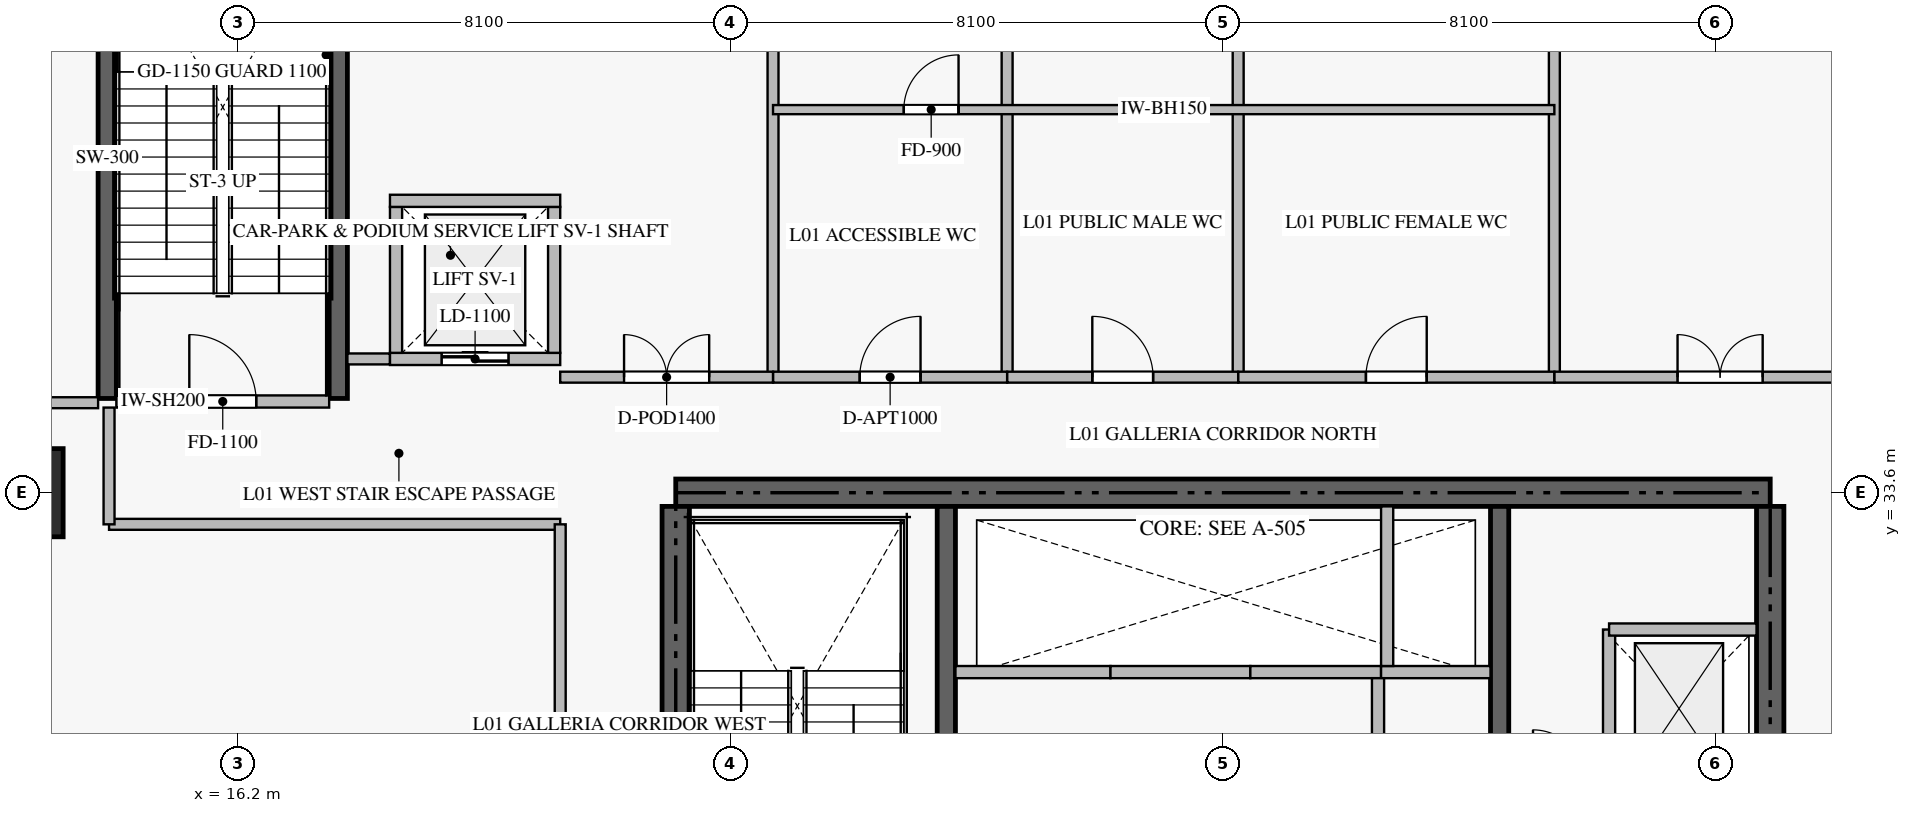
"""IFC4 building model, lengths in metres.
Left out: names, types, materials, properties, quantities, classifications, styles, units other than length and angle.
Written with IfcOpenShell. Run it as: python <this file> out.ifc"""

import sys

from ifc_helpers import new_model, si_unit, direction, frame, frame_2d, origin, origin_2d, place, context, subcontext, project, spatial, rectangle, extrude, source, transform, mapped, element, fill, save


model = new_model("IFC4")
c1 = context("Model", 3, precision=1e-05, world=origin(), true_north=direction((0.0, 1.0)))
c2 = subcontext(c1, "Body", "Model", "MODEL_VIEW")
j1 = project(units=[si_unit("LENGTHUNIT", "METRE"), si_unit("PLANEANGLEUNIT", "RADIAN")], contexts=[c1])
p1 = place(None, origin())
s1 = spatial("IfcSite", under=j1, at=p1, CompositionType="ELEMENT")
p2 = place(p1, origin())
s2 = spatial("IfcBuilding", under=s1, at=p2, CompositionType="ELEMENT")
p3 = place(p2, frame((0.0, 0.0, 5.5)))
s3 = spatial("IfcBuildingStorey", under=s2, at=p3, CompositionType="ELEMENT", Elevation=5.5)
p4 = place(p3, frame((41.4, 33.6, -0.38), z_axis=(0.0, 0.0, 1.0), x_axis=(-1.0, 0.0, 0.0)))
e1 = element("IfcWall", 1, at=p4, inside=s3, PredefinedType="SHEAR", context=c2, shape_type="SweptSolid", body=[
    extrude(rectangle(XDim=18.0, YDim=0.45, at=frame_2d((9.0, 0.0))), origin(), (0.0, 0.0, 1.0), 4.998),
])
p5 = place(p3, frame((23.4, 24.25, -0.38), z_axis=(0.0, 0.0, 1.0), x_axis=(0.0, 1.0, 0.0)))
e2 = element("IfcWall", 2, at=p5, inside=s3, PredefinedType="SHEAR", context=c2, shape_type="SweptSolid", body=[
    extrude(rectangle(XDim=9.125, YDim=0.45, at=frame_2d((4.562, 0.0))), origin(), (0.0, 0.0, 1.0), 4.998),
])
p6 = place(p3, frame((41.4, 27.75, -0.38), z_axis=(0.0, 0.0, 1.0), x_axis=(0.0, 1.0, 0.0)))
e3 = element("IfcWall", 3, at=p6, inside=s3, PredefinedType="SHEAR", context=c2, shape_type="SweptSolid", body=[
    extrude(rectangle(XDim=5.625, YDim=0.45, at=frame_2d((2.812, 0.0))), origin(), (0.0, 0.0, 1.0), 4.998),
])
p7 = place(p3, frame((27.85, 23.55, -0.38), z_axis=(0.0, 0.0, 1.0), x_axis=(0.0, 1.0, 0.0)))
e4 = element("IfcWall", 4, at=p7, inside=s3, PredefinedType="SHEAR", context=c2, shape_type="SweptSolid", body=[
    extrude(rectangle(XDim=9.825, YDim=0.3, at=frame_2d((4.913, 0.0))), origin(), (0.0, 0.0, 1.0), 4.998),
])
p8 = place(p3, frame((36.95, 27.05, -0.38), z_axis=(0.0, 0.0, 1.0), x_axis=(0.0, 1.0, 0.0)))
e5 = element("IfcWall", 5, at=p8, inside=s3, PredefinedType="SHEAR", context=c2, shape_type="SweptSolid", body=[
    extrude(rectangle(XDim=6.325, YDim=0.3, at=frame_2d((3.163, 0.0))), origin(), (0.0, 0.0, 1.0), 4.998),
])
m1 = source(origin(), c2, "Body", "SweptSolid", [
    extrude(rectangle(XDim=1.45, YDim=1.45, at=origin_2d()), origin(), (0.0, 0.0, 1.0), 5.0),
])
p9 = place(p3, frame((12.6, 33.6, -0.38), z_axis=(0.0, 0.0, 1.0), x_axis=(1.0, 0.0, 0.0)))
e6 = element("IfcColumn", 6, at=p9, inside=s3, PredefinedType="COLUMN", context=c2, shape_type="MappedRepresentation", body=[
    mapped(m1, transform((0.0, 0.0, 0.0), scale=1.0)),
])
for number, where, z_axis, x_axis in (
    (7, (14.05, 35.15, -0.38), (0.0, 0.0, 1.0), (0.0, 1.0, 0.0)),
    (8, (17.85, 35.15, -0.38), (0.0, 0.0, 1.0), (0.0, 1.0, 0.0)),
):
    element("IfcWall", number, at=place(p3, frame(where, z_axis=z_axis, x_axis=x_axis)), inside=s3, PredefinedType="SHEAR", context=c2, shape_type="SweptSolid", body=[
        extrude(rectangle(XDim=7.9, YDim=0.3, at=frame_2d((3.95, 0.0))), origin(), (0.0, 0.0, 1.0), 4.998),
    ])
p10 = place(p3, frame((14.2, 35.1, 0.0), z_axis=(0.0, 0.0, 1.0), x_axis=(1.0, 0.0, 0.0)))
e9 = element("IfcWall", 9, at=p10, inside=s3, PredefinedType="STANDARD", context=c2, shape_type="SweptSolid", body=[
    extrude(rectangle(XDim=3.5, YDim=0.2, at=frame_2d((1.75, 0.0))), origin(), (0.0, 0.0, 1.0), 4.62),
])
p11 = place(p10, frame((1.2, 0.0, 0.0)))
e10 = element("IfcOpeningElement", 10, at=p11, cuts=e9, PredefinedType="OPENING", context=c2, shape_type="SweptSolid", body=[
    extrude(rectangle(XDim=1.1, YDim=2.15, at=frame_2d((0.55, 1.075))), frame((0.0, 0.11, 0.0), z_axis=(0.0, -1.0, 0.0), x_axis=(1.0, 0.0, 0.0)), (0.0, 0.0, 1.0), 0.22),
])
p12 = place(p3, frame((28.0, 30.65, 0.0), z_axis=(0.0, 0.0, 1.0), x_axis=(1.0, 0.0, 0.0)))
e11 = element("IfcWall", 11, at=p12, inside=s3, PredefinedType="STANDARD", context=c2, shape_type="SweptSolid", body=[
    extrude(rectangle(XDim=2.55, YDim=0.2, at=frame_2d((1.275, 0.0))), origin(), (0.0, 0.0, 1.0), 4.62),
])
p13 = place(p3, frame((30.55, 30.65, 0.0), z_axis=(0.0, 0.0, 1.0), x_axis=(1.0, 0.0, 0.0)))
e12 = element("IfcWall", 12, at=p13, inside=s3, PredefinedType="STANDARD", context=c2, shape_type="SweptSolid", body=[
    extrude(rectangle(XDim=2.3, YDim=0.2, at=frame_2d((1.15, 0.0))), origin(), (0.0, 0.0, 1.0), 4.62),
])
p14 = place(p3, frame((32.85, 30.65, 0.0), z_axis=(0.0, 0.0, 1.0), x_axis=(1.0, 0.0, 0.0)))
e13 = element("IfcWall", 13, at=p14, inside=s3, PredefinedType="STANDARD", context=c2, shape_type="SweptSolid", body=[
    extrude(rectangle(XDim=2.15, YDim=0.2, at=frame_2d((1.075, 0.0))), origin(), (0.0, 0.0, 1.0), 4.62),
])
p15 = place(p3, frame((35.0, 30.65, 0.0), z_axis=(0.0, 0.0, 1.0), x_axis=(1.0, 0.0, 0.0)))
e14 = element("IfcWall", 14, at=p15, inside=s3, PredefinedType="STANDARD", context=c2, shape_type="SweptSolid", body=[
    extrude(rectangle(XDim=1.8, YDim=0.2, at=frame_2d((0.9, 0.0))), origin(), (0.0, 0.0, 1.0), 4.62),
])
p16 = place(p3, frame((35.1, 30.75, 0.0), z_axis=(0.0, 0.0, 1.0), x_axis=(0.0, 1.0, 0.0)))
e15 = element("IfcWall", 15, at=p16, inside=s3, PredefinedType="STANDARD", context=c2, shape_type="SweptSolid", body=[
    extrude(rectangle(XDim=2.625, YDim=0.2, at=frame_2d((1.312, 0.0))), origin(), (0.0, 0.0, 1.0), 4.62),
])
p17 = place(p3, frame((18.7, 35.8, 0.0), z_axis=(0.0, 0.0, 1.0), x_axis=(1.0, 0.0, 0.0)))
e16 = element("IfcWall", 16, at=p17, inside=s3, PredefinedType="STANDARD", context=c2, shape_type="SweptSolid", body=[
    extrude(rectangle(XDim=2.8, YDim=0.2, at=frame_2d((1.4, 0.0))), origin(), (0.0, 0.0, 1.0), 4.62),
])
p18 = place(p17, frame((0.85, 0.0, 0.0)))
e17 = element("IfcOpeningElement", 17, at=p18, cuts=e16, PredefinedType="OPENING", context=c2, shape_type="SweptSolid", body=[
    extrude(rectangle(XDim=1.1, YDim=2.2, at=frame_2d((0.55, 1.1))), frame((0.0, 0.11, 0.0), z_axis=(0.0, -1.0, 0.0), x_axis=(1.0, 0.0, 0.0)), (0.0, 0.0, 1.0), 0.22),
])
for number, where, z_axis, x_axis in (
    (18, (18.8, 35.9, 0.0), (0.0, 0.0, 1.0), (0.0, 1.0, 0.0)),
    (19, (21.4, 35.9, 0.0), (0.0, 0.0, 1.0), (0.0, 1.0, 0.0)),
):
    element("IfcWall", number, at=place(p3, frame(where, z_axis=z_axis, x_axis=x_axis)), inside=s3, PredefinedType="STANDARD", context=c2, shape_type="SweptSolid", body=[
        extrude(rectangle(XDim=2.4, YDim=0.2, at=frame_2d((1.2, 0.0))), origin(), (0.0, 0.0, 1.0), 4.62),
    ])
p19 = place(p3, frame((18.7, 38.4, 0.0), z_axis=(0.0, 0.0, 1.0), x_axis=(1.0, 0.0, 0.0)))
e20 = element("IfcWall", 20, at=p19, inside=s3, PredefinedType="STANDARD", context=c2, shape_type="SweptSolid", body=[
    extrude(rectangle(XDim=2.8, YDim=0.2, at=frame_2d((1.4, 0.0))), origin(), (0.0, 0.0, 1.0), 4.62),
])
p20 = place(p3, frame((38.75, 28.85, 0.0), z_axis=(0.0, 0.0, 1.0), x_axis=(0.0, 1.0, 0.0)))
e21 = element("IfcWall", 21, at=p20, inside=s3, PredefinedType="STANDARD", context=c2, shape_type="SweptSolid", body=[
    extrude(rectangle(XDim=2.5, YDim=0.2, at=frame_2d((1.25, 0.0))), origin(), (0.0, 0.0, 1.0), 4.62),
])
p21 = place(p3, frame((38.75, 31.35, 0.0), z_axis=(0.0, 0.0, 1.0), x_axis=(1.0, 0.0, 0.0)))
e22 = element("IfcWall", 22, at=p21, inside=s3, PredefinedType="STANDARD", context=c2, shape_type="SweptSolid", body=[
    extrude(rectangle(XDim=2.425, YDim=0.2, at=frame_2d((1.212, 0.0))), origin(), (0.0, 0.0, 1.0), 4.62),
])
p22 = place(p3, frame((34.95, 26.95, 0.0), z_axis=(0.0, 0.0, 1.0), x_axis=(0.0, 1.0, 0.0)))
e23 = element("IfcWall", 23, at=p22, inside=s3, PredefinedType="STANDARD", context=c2, shape_type="SweptSolid", body=[
    extrude(rectangle(XDim=3.6, YDim=0.2, at=frame_2d((1.8, 0.0))), origin(), (0.0, 0.0, 1.0), 4.62),
])
p23 = place(p22, frame((1.35, 0.0, 0.0)))
e24 = element("IfcOpeningElement", 24, at=p23, cuts=e23, PredefinedType="OPENING", context=c2, shape_type="SweptSolid", body=[
    extrude(rectangle(XDim=0.9, YDim=2.1, at=frame_2d((0.45, 1.05))), frame((0.0, 0.11, 0.0), z_axis=(0.0, -1.0, 0.0), x_axis=(1.0, 0.0, 0.0)), (0.0, 0.0, 1.0), 0.22),
])
p24 = place(p3, frame((0.082, 35.08, 0.0), z_axis=(0.0, 0.0, 1.0), x_axis=(1.0, 0.0, 0.0)))
e25 = element("IfcWall", 25, at=p24, inside=s3, PredefinedType="PARTITIONING", context=c2, shape_type="SweptSolid", body=[
    extrude(rectangle(XDim=13.818, YDim=0.18, at=frame_2d((6.909, 0.0))), origin(), (0.0, 0.0, 1.0), 4.62),
])
p25 = place(p3, frame((14.08, 33.08, 0.0), z_axis=(0.0, 0.0, 1.0), x_axis=(1.0, 0.0, 0.0)))
e26 = element("IfcWall", 26, at=p25, inside=s3, PredefinedType="PARTITIONING", context=c2, shape_type="SweptSolid", body=[
    extrude(rectangle(XDim=7.42, YDim=0.18, at=frame_2d((3.71, 0.0))), origin(), (0.0, 0.0, 1.0), 4.62),
])
p26 = place(p3, frame((18.0, 35.8, 0.0), z_axis=(0.0, 0.0, 1.0), x_axis=(1.0, 0.0, 0.0)))
e27 = element("IfcWall", 27, at=p26, inside=s3, PredefinedType="PARTITIONING", context=c2, shape_type="SweptSolid", body=[
    extrude(rectangle(XDim=0.698, YDim=0.18, at=frame_2d((0.349, 0.0))), origin(), (0.0, 0.0, 1.0), 4.62),
])
p27 = place(p3, frame((14.08, 33.08, 0.0), z_axis=(0.0, 0.0, 1.0), x_axis=(0.0, 1.0, 0.0)))
e28 = element("IfcWall", 28, at=p27, inside=s3, PredefinedType="PARTITIONING", context=c2, shape_type="SweptSolid", body=[
    extrude(rectangle(XDim=1.92, YDim=0.18, at=frame_2d((0.96, 0.0))), origin(), (0.0, 0.0, 1.0), 4.62),
])
p28 = place(p3, frame((21.5, 14.9, 0.0), z_axis=(0.0, 0.0, 1.0), x_axis=(0.0, 1.0, 0.0)))
e29 = element("IfcWall", 29, at=p28, inside=s3, PredefinedType="PARTITIONING", context=c2, shape_type="SweptSolid", body=[
    extrude(rectangle(XDim=18.18, YDim=0.18, at=frame_2d((9.09, 0.0))), origin(), (0.0, 0.0, 1.0), 4.62),
])
p29 = place(p28, frame((8.34, 0.0, 0.0)))
e30 = element("IfcOpeningElement", 30, at=p29, cuts=e29, PredefinedType="OPENING", context=c2, shape_type="SweptSolid", body=[
    extrude(rectangle(XDim=1.5, YDim=2.25, at=frame_2d((0.75, 1.125))), frame((0.0, 0.1, 0.0), z_axis=(0.0, -1.0, 0.0), x_axis=(1.0, 0.0, 0.0)), (0.0, 0.0, 1.0), 0.2),
])
for number, where, z_axis, x_axis in (
    (31, (25.0, 35.5, 0.0), (0.0, 0.0, 1.0), (0.0, 1.0, 0.0)),
    (32, (28.85, 35.5, 0.0), (0.0, 0.0, 1.0), (0.0, 1.0, 0.0)),
    (33, (32.65, 35.5, 0.0), (0.0, 0.0, 1.0), (0.0, 1.0, 0.0)),
    (34, (37.85, 35.5, 0.0), (0.0, 0.0, 1.0), (0.0, 1.0, 0.0)),
):
    element("IfcWall", number, at=place(p3, frame(where, z_axis=z_axis, x_axis=x_axis)), inside=s3, PredefinedType="PARTITIONING", context=c2, shape_type="SweptSolid", body=[
        extrude(rectangle(XDim=12.418, YDim=0.18, at=frame_2d((6.209, 0.0))), origin(), (0.0, 0.0, 1.0), 4.62),
    ])
p30 = place(p3, frame((21.5, 35.5, 0.0), z_axis=(0.0, 0.0, 1.0), x_axis=(1.0, 0.0, 0.0)))
e35 = element("IfcWall", 35, at=p30, inside=s3, PredefinedType="PARTITIONING", context=c2, shape_type="SweptSolid", body=[
    extrude(rectangle(XDim=3.5, YDim=0.18, at=frame_2d((1.75, 0.0))), origin(), (0.0, 0.0, 1.0), 4.62),
])
p31 = place(p30, frame((1.05, 0.0, 0.0)))
e36 = element("IfcOpeningElement", 36, at=p31, cuts=e35, PredefinedType="OPENING", context=c2, shape_type="SweptSolid", body=[
    extrude(rectangle(XDim=1.4, YDim=2.25, at=frame_2d((0.7, 1.125))), frame((0.0, 0.1, 0.0), z_axis=(0.0, -1.0, 0.0), x_axis=(1.0, 0.0, 0.0)), (0.0, 0.0, 1.0), 0.2),
])
p32 = place(p3, frame((25.002, 35.5, 0.0), z_axis=(0.0, 0.0, 1.0), x_axis=(1.0, 0.0, 0.0)))
e37 = element("IfcWall", 37, at=p32, inside=s3, PredefinedType="PARTITIONING", context=c2, shape_type="SweptSolid", body=[
    extrude(rectangle(XDim=3.848, YDim=0.18, at=frame_2d((1.924, 0.0))), origin(), (0.0, 0.0, 1.0), 4.62),
])
p33 = place(p32, frame((1.424, 0.0, 0.0)))
e38 = element("IfcOpeningElement", 38, at=p33, cuts=e37, PredefinedType="OPENING", context=c2, shape_type="SweptSolid", body=[
    extrude(rectangle(XDim=1.0, YDim=2.15, at=frame_2d((0.5, 1.075))), frame((0.0, 0.1, 0.0), z_axis=(0.0, -1.0, 0.0), x_axis=(1.0, 0.0, 0.0)), (0.0, 0.0, 1.0), 0.2),
])
p34 = place(p3, frame((28.852, 35.5, 0.0), z_axis=(0.0, 0.0, 1.0), x_axis=(1.0, 0.0, 0.0)))
e39 = element("IfcWall", 39, at=p34, inside=s3, PredefinedType="PARTITIONING", context=c2, shape_type="SweptSolid", body=[
    extrude(rectangle(XDim=3.798, YDim=0.18, at=frame_2d((1.899, 0.0))), origin(), (0.0, 0.0, 1.0), 4.62),
])
p35 = place(p34, frame((1.399, 0.0, 0.0)))
e40 = element("IfcOpeningElement", 40, at=p35, cuts=e39, PredefinedType="OPENING", context=c2, shape_type="SweptSolid", body=[
    extrude(rectangle(XDim=1.0, YDim=2.15, at=frame_2d((0.5, 1.075))), frame((0.0, 0.1, 0.0), z_axis=(0.0, -1.0, 0.0), x_axis=(1.0, 0.0, 0.0)), (0.0, 0.0, 1.0), 0.2),
])
p36 = place(p3, frame((32.652, 35.5, 0.0), z_axis=(0.0, 0.0, 1.0), x_axis=(1.0, 0.0, 0.0)))
e41 = element("IfcWall", 41, at=p36, inside=s3, PredefinedType="PARTITIONING", context=c2, shape_type="SweptSolid", body=[
    extrude(rectangle(XDim=5.198, YDim=0.18, at=frame_2d((2.599, 0.0))), origin(), (0.0, 0.0, 1.0), 4.62),
])
p37 = place(p36, frame((2.099, 0.0, 0.0)))
e42 = element("IfcOpeningElement", 42, at=p37, cuts=e41, PredefinedType="OPENING", context=c2, shape_type="SweptSolid", body=[
    extrude(rectangle(XDim=1.0, YDim=2.15, at=frame_2d((0.5, 1.075))), frame((0.0, 0.1, 0.0), z_axis=(0.0, -1.0, 0.0), x_axis=(1.0, 0.0, 0.0)), (0.0, 0.0, 1.0), 0.2),
])
p38 = place(p3, frame((37.852, 35.5, 0.0), z_axis=(0.0, 0.0, 1.0), x_axis=(1.0, 0.0, 0.0)))
e43 = element("IfcWall", 43, at=p38, inside=s3, PredefinedType="PARTITIONING", context=c2, shape_type="SweptSolid", body=[
    extrude(rectangle(XDim=5.448, YDim=0.18, at=frame_2d((2.724, 0.0))), origin(), (0.0, 0.0, 1.0), 4.62),
])
p39 = place(p38, frame((2.024, 0.0, 0.0)))
e44 = element("IfcOpeningElement", 44, at=p39, cuts=e43, PredefinedType="OPENING", context=c2, shape_type="SweptSolid", body=[
    extrude(rectangle(XDim=1.4, YDim=2.25, at=frame_2d((0.7, 1.125))), frame((0.0, 0.1, 0.0), z_axis=(0.0, -1.0, 0.0), x_axis=(1.0, 0.0, 0.0)), (0.0, 0.0, 1.0), 0.2),
])
p40 = place(p3, frame((25.0, 39.9, 0.0), z_axis=(0.0, 0.0, 1.0), x_axis=(1.0, 0.0, 0.0)))
e45 = element("IfcWall", 45, at=p40, inside=s3, PredefinedType="PARTITIONING", context=c2, shape_type="SweptSolid", body=[
    extrude(rectangle(XDim=12.85, YDim=0.15, at=frame_2d((6.425, 0.0))), origin(), (0.0, 0.0, 1.0), 4.62),
])
p41 = place(p40, frame((2.151, 0.0, 0.0)))
e46 = element("IfcOpeningElement", 46, at=p41, cuts=e45, PredefinedType="OPENING", context=c2, shape_type="SweptSolid", body=[
    extrude(rectangle(XDim=0.9, YDim=2.1, at=frame_2d((0.45, 1.05))), frame((0.0, 0.085, 0.0), z_axis=(0.0, -1.0, 0.0), x_axis=(1.0, 0.0, 0.0)), (0.0, 0.0, 1.0), 0.17),
])
m2 = source(origin(), c2, "Body", "SweptSolid", [
    extrude(rectangle(XDim=1.1, YDim=2.15, at=frame_2d((0.55, 1.075))), frame((0.0, 0.025, 0.0), z_axis=(0.0, -1.0, 0.0), x_axis=(1.0, 0.0, 0.0)), (0.0, 0.0, 1.0), 0.05),
])
p42 = place(p11, origin())
e47 = element("IfcDoor", 47, at=p42, inside=s3, OperationType="SINGLE_SWING_LEFT", PredefinedType="DOOR", context=c2, shape_type="MappedRepresentation", body=[
    mapped(m2, transform((0.0, 0.0, 0.0), scale=1.0)),
])
fill(e10, e47)
m3 = source(origin(), c2, "Body", "SweptSolid", [
    extrude(rectangle(XDim=1.1, YDim=2.2, at=frame_2d((0.55, 1.1))), frame((0.0, 0.025, 0.0), z_axis=(0.0, -1.0, 0.0), x_axis=(1.0, 0.0, 0.0)), (0.0, 0.0, 1.0), 0.05),
])
p43 = place(p18, origin())
e48 = element("IfcDoor", 48, at=p43, inside=s3, OperationType="DOUBLE_DOOR_SLIDING", PredefinedType="DOOR", context=c2, shape_type="MappedRepresentation", body=[
    mapped(m3, transform((0.0, 0.0, 0.0), scale=1.0)),
])
fill(e17, e48)
m4 = source(origin(), c2, "Body", "SweptSolid", [
    extrude(rectangle(XDim=1.4, YDim=2.25, at=frame_2d((0.7, 1.125))), frame((0.0, 0.025, 0.0), z_axis=(0.0, -1.0, 0.0), x_axis=(1.0, 0.0, 0.0)), (0.0, 0.0, 1.0), 0.05),
])
p44 = place(p31, origin())
e49 = element("IfcDoor", 49, at=p44, inside=s3, OperationType="DOUBLE_DOOR_SINGLE_SWING", PredefinedType="DOOR", context=c2, shape_type="MappedRepresentation", body=[
    mapped(m4, transform((0.0, 0.0, 0.0), scale=1.0)),
])
fill(e36, e49)
m5 = source(origin(), c2, "Body", "SweptSolid", [
    extrude(rectangle(XDim=1.0, YDim=2.15, at=frame_2d((0.5, 1.075))), frame((0.0, 0.025, 0.0), z_axis=(0.0, -1.0, 0.0), x_axis=(1.0, 0.0, 0.0)), (0.0, 0.0, 1.0), 0.05),
])
p45 = place(p33, origin())
e50 = element("IfcDoor", 50, at=p45, inside=s3, OperationType="SINGLE_SWING_RIGHT", PredefinedType="DOOR", context=c2, shape_type="MappedRepresentation", body=[
    mapped(m5, transform((0.0, 0.0, 0.0), scale=1.0)),
])
fill(e38, e50)
p46 = place(p35, origin())
e51 = element("IfcDoor", 51, at=p46, inside=s3, OperationType="SINGLE_SWING_LEFT", PredefinedType="DOOR", context=c2, shape_type="MappedRepresentation", body=[
    mapped(m5, transform((0.0, 0.0, 0.0), scale=1.0)),
])
fill(e40, e51)
p47 = place(p37, origin())
e52 = element("IfcDoor", 52, at=p47, inside=s3, OperationType="SINGLE_SWING_RIGHT", PredefinedType="DOOR", context=c2, shape_type="MappedRepresentation", body=[
    mapped(m5, transform((0.0, 0.0, 0.0), scale=1.0)),
])
fill(e42, e52)
p48 = place(p39, origin())
e53 = element("IfcDoor", 53, at=p48, inside=s3, OperationType="DOUBLE_DOOR_SINGLE_SWING", PredefinedType="DOOR", context=c2, shape_type="MappedRepresentation", body=[
    mapped(m4, transform((0.0, 0.0, 0.0), scale=1.0)),
])
fill(e44, e53)
m6 = source(origin(), c2, "Body", "SweptSolid", [
    extrude(rectangle(XDim=0.9, YDim=2.1, at=frame_2d((0.45, 1.05))), frame((0.0, 0.025, 0.0), z_axis=(0.0, -1.0, 0.0), x_axis=(1.0, 0.0, 0.0)), (0.0, 0.0, 1.0), 0.05),
])
p49 = place(p41, origin())
e54 = element("IfcDoor", 54, at=p49, inside=s3, OperationType="SINGLE_SWING_RIGHT", PredefinedType="DOOR", context=c2, shape_type="MappedRepresentation", body=[
    mapped(m6, transform((0.0, 0.0, 0.0), scale=1.0)),
])
fill(e46, e54)
save(model, sys.argv[1])
